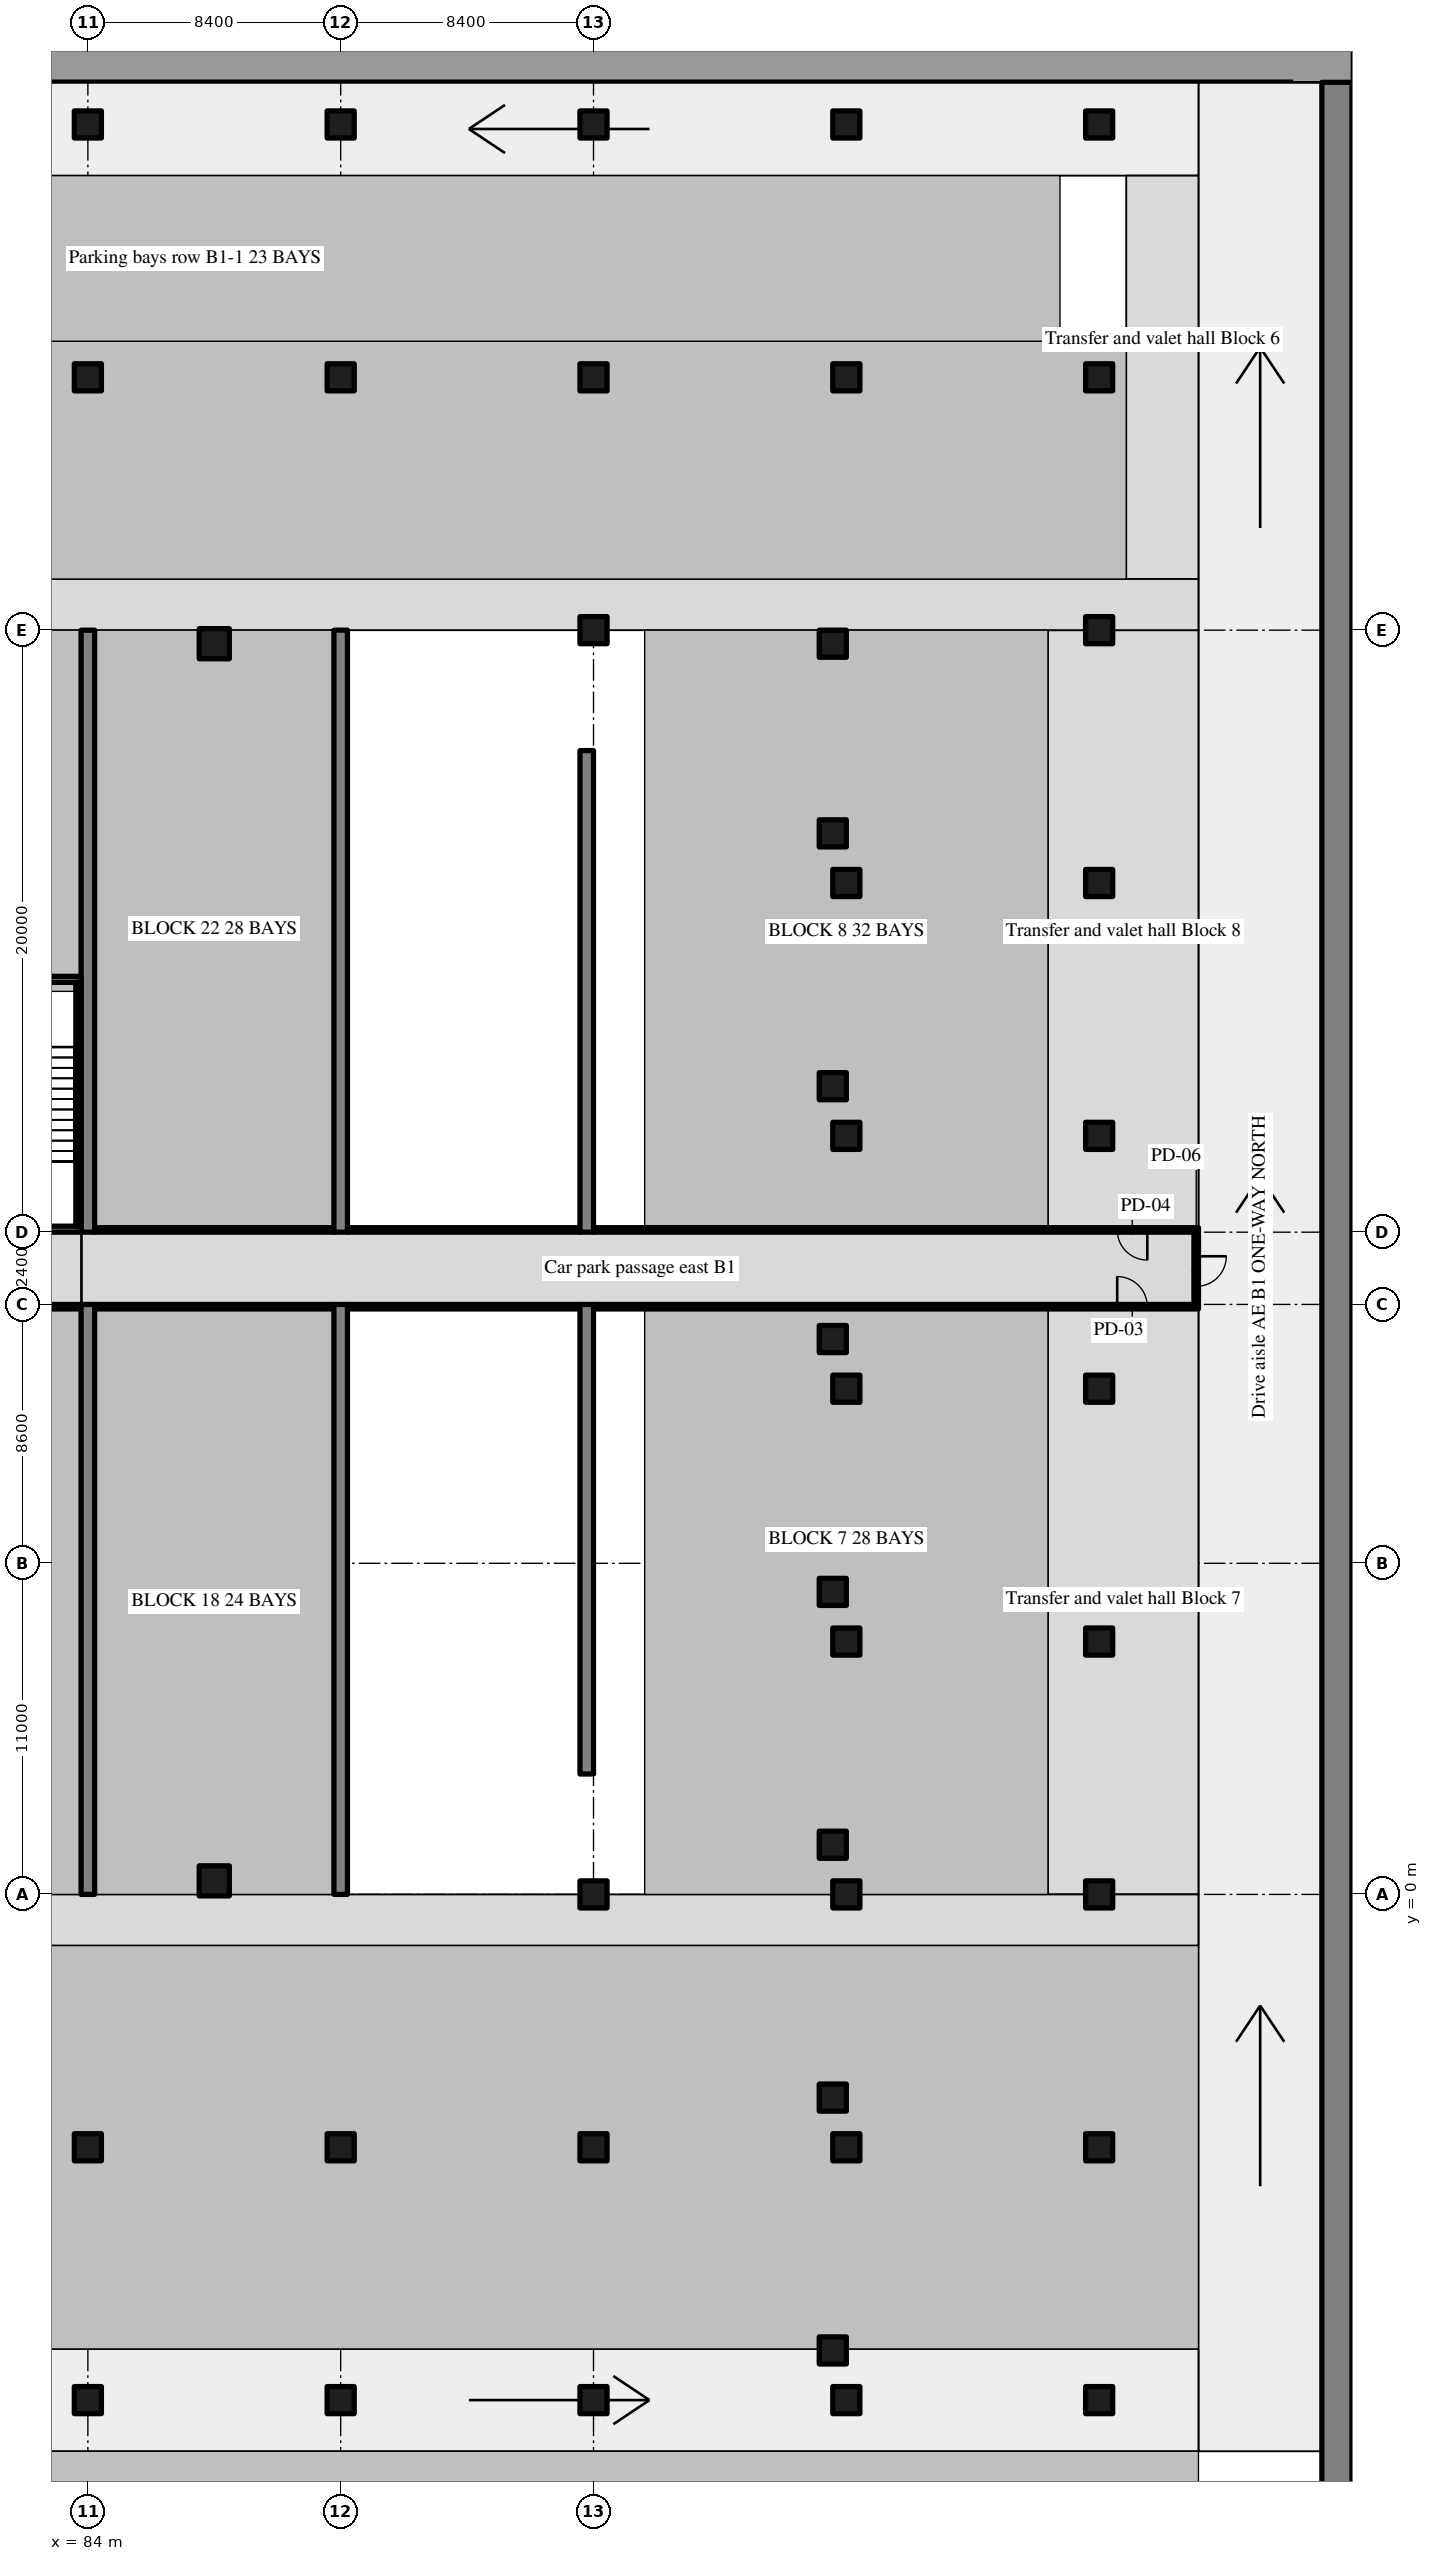
"""IFC4 building model, lengths in metres.
Left out: names, types, materials, properties, quantities, classifications, styles, units other than length and angle.
Written with IfcOpenShell. Run it as: python <this file> out.ifc"""

import sys

from ifc_helpers import new_model, si_unit, direction, frame, frame_2d, origin, origin_2d, place, context, subcontext, project, spatial, rectangle, extrude, source, transform, mapped, element, fill, save


model = new_model("IFC4")
c1 = context("Model", 3, precision=1e-05, world=origin(), true_north=direction((0.0, 1.0)))
c2 = subcontext(c1, "Body", "Model", "MODEL_VIEW")
j1 = project(units=[si_unit("LENGTHUNIT", "METRE"), si_unit("PLANEANGLEUNIT", "RADIAN")], contexts=[c1])
p1 = place(None, origin())
s1 = spatial("IfcSite", under=j1, at=p1, CompositionType="ELEMENT")
p2 = place(p1, origin())
s2 = spatial("IfcBuilding", under=s1, at=p2, CompositionType="ELEMENT")
p3 = place(p2, frame((0.0, 0.0, -4.5)))
s3 = spatial("IfcBuildingStorey", under=s2, at=p3, CompositionType="ELEMENT", Elevation=-4.5)
m1 = source(origin(), c2, "Body", "SweptSolid", [
    extrude(rectangle(XDim=92.8, YDim=1.0, at=frame_2d((46.4, 0.0))), origin(), (0.0, 0.0, 1.0), 4.22),
])
p4 = place(p3, frame((125.5, -32.6, 0.0), z_axis=(0.0, 0.0, 1.0), x_axis=(0.0, 1.0, 0.0)))
e1 = element("IfcWall", 1, at=p4, inside=s3, PredefinedType="SHEAR", context=c2, shape_type="MappedRepresentation", body=[
    mapped(m1, transform((0.0, 0.0, 0.0), scale=1.0)),
])
m2 = source(origin(), c2, "Body", "SweptSolid", [
    extrude(rectangle(XDim=19.6, YDim=0.45, at=frame_2d((9.8, 0.0))), origin(), (0.0, 0.0, 1.0), 4.22),
])
p5 = place(p3, frame((84.0, 0.0, 0.0), z_axis=(0.0, 0.0, 1.0), x_axis=(0.0, 1.0, 0.0)))
e2 = element("IfcWall", 2, at=p5, inside=s3, PredefinedType="SHEAR", context=c2, shape_type="MappedRepresentation", body=[
    mapped(m2, transform((0.0, 0.0, 0.0), scale=1.0)),
])
m3 = source(origin(), c2, "Body", "SweptSolid", [
    extrude(rectangle(XDim=20.0, YDim=0.45, at=frame_2d((10.0, 0.0))), origin(), (0.0, 0.0, 1.0), 4.22),
])
p6 = place(p3, frame((84.0, 22.0, 0.0), z_axis=(0.0, 0.0, 1.0), x_axis=(0.0, 1.0, 0.0)))
e3 = element("IfcWall", 3, at=p6, inside=s3, PredefinedType="SHEAR", context=c2, shape_type="MappedRepresentation", body=[
    mapped(m3, transform((0.0, 0.0, 0.0), scale=1.0)),
])
p7 = place(p3, frame((92.4, 0.0, 0.0), z_axis=(0.0, 0.0, 1.0), x_axis=(0.0, 1.0, 0.0)))
e4 = element("IfcWall", 4, at=p7, inside=s3, PredefinedType="SHEAR", context=c2, shape_type="MappedRepresentation", body=[
    mapped(m2, transform((0.0, 0.0, 0.0), scale=1.0)),
])
p8 = place(p3, frame((92.4, 22.0, 0.0), z_axis=(0.0, 0.0, 1.0), x_axis=(0.0, 1.0, 0.0)))
e5 = element("IfcWall", 5, at=p8, inside=s3, PredefinedType="SHEAR", context=c2, shape_type="MappedRepresentation", body=[
    mapped(m3, transform((0.0, 0.0, 0.0), scale=1.0)),
])
m4 = source(origin(), c2, "Body", "SweptSolid", [
    extrude(rectangle(XDim=15.6, YDim=0.45, at=frame_2d((7.8, 0.0))), origin(), (0.0, 0.0, 1.0), 4.22),
])
p9 = place(p3, frame((100.575, 4.0, 0.0), z_axis=(0.0, 0.0, 1.0), x_axis=(0.0, 1.0, 0.0)))
e6 = element("IfcWall", 6, at=p9, inside=s3, PredefinedType="SHEAR", context=c2, shape_type="MappedRepresentation", body=[
    mapped(m4, transform((0.0, 0.0, 0.0), scale=1.0)),
])
m5 = source(origin(), c2, "Body", "SweptSolid", [
    extrude(rectangle(XDim=16.0, YDim=0.45, at=frame_2d((8.0, 0.0))), origin(), (0.0, 0.0, 1.0), 4.22),
])
p10 = place(p3, frame((100.575, 22.0, 0.0), z_axis=(0.0, 0.0, 1.0), x_axis=(0.0, 1.0, 0.0)))
e7 = element("IfcWall", 7, at=p10, inside=s3, PredefinedType="SHEAR", context=c2, shape_type="MappedRepresentation", body=[
    mapped(m5, transform((0.0, 0.0, 0.0), scale=1.0)),
])
m6 = source(origin(), c2, "Body", "SweptSolid", [
    extrude(rectangle(XDim=1.0, YDim=1.0, at=origin_2d()), origin(), (0.0, 0.0, 1.0), 4.22),
])
for number, where, z_axis, x_axis in (
    (8, (88.2, 0.45, 0.0), (0.0, 0.0, 1.0), (1.0, 0.0, 0.0)),
    (9, (88.2, 41.55, 0.0), (0.0, 0.0, 1.0), (1.0, 0.0, 0.0)),
):
    element("IfcColumn", number, at=place(p3, frame(where, z_axis=z_axis, x_axis=x_axis)), inside=s3, PredefinedType="COLUMN", context=c2, shape_type="MappedRepresentation", body=[
        mapped(m6, transform((0.0, 0.0, 0.0), scale=1.0)),
    ])
m7 = source(origin(), c2, "Body", "SweptSolid", [
    extrude(rectangle(XDim=0.9, YDim=0.9, at=origin_2d()), origin(), (0.0, 0.0, 1.0), 4.22),
])
for number, where, z_axis, x_axis in (
    (10, (108.75, -15.15, 0.0), (0.0, 0.0, 1.0), (1.0, 0.0, 0.0)),
    (11, (108.75, -6.75, 0.0), (0.0, 0.0, 1.0), (1.0, 0.0, 0.0)),
    (12, (108.75, 1.65, 0.0), (0.0, 0.0, 1.0), (1.0, 0.0, 0.0)),
    (13, (108.75, 10.05, 0.0), (0.0, 0.0, 1.0), (1.0, 0.0, 0.0)),
    (14, (108.75, 18.45, 0.0), (0.0, 0.0, 1.0), (1.0, 0.0, 0.0)),
    (15, (108.75, 26.85, 0.0), (0.0, 0.0, 1.0), (1.0, 0.0, 0.0)),
    (16, (108.75, 35.25, 0.0), (0.0, 0.0, 1.0), (1.0, 0.0, 0.0)),
    (17, (108.75, 41.55, 0.0), (0.0, 0.0, 1.0), (1.0, 0.0, 0.0)),
    (18, (84.0, -16.8, 0.0), (0.0, 0.0, 1.0), (1.0, 0.0, 0.0)),
    (19, (84.0, -8.4, 0.0), (0.0, 0.0, 1.0), (1.0, 0.0, 0.0)),
    (20, (84.0, 50.4, 0.0), (0.0, 0.0, 1.0), (1.0, 0.0, 0.0)),
    (21, (84.0, 58.8, 0.0), (0.0, 0.0, 1.0), (1.0, 0.0, 0.0)),
    (22, (92.4, -16.8, 0.0), (0.0, 0.0, 1.0), (1.0, 0.0, 0.0)),
    (23, (92.4, -8.4, 0.0), (0.0, 0.0, 1.0), (1.0, 0.0, 0.0)),
    (24, (92.4, 50.4, 0.0), (0.0, 0.0, 1.0), (1.0, 0.0, 0.0)),
    (25, (92.4, 58.8, 0.0), (0.0, 0.0, 1.0), (1.0, 0.0, 0.0)),
    (26, (100.8, -16.8, 0.0), (0.0, 0.0, 1.0), (1.0, 0.0, 0.0)),
    (27, (100.8, -8.4, 0.0), (0.0, 0.0, 1.0), (1.0, 0.0, 0.0)),
    (28, (100.8, 0.0, 0.0), (0.0, 0.0, 1.0), (1.0, 0.0, 0.0)),
    (29, (100.8, 42.0, 0.0), (0.0, 0.0, 1.0), (1.0, 0.0, 0.0)),
    (30, (100.8, 50.4, 0.0), (0.0, 0.0, 1.0), (1.0, 0.0, 0.0)),
    (31, (100.8, 58.8, 0.0), (0.0, 0.0, 1.0), (1.0, 0.0, 0.0)),
    (32, (109.2, -16.8, 0.0), (0.0, 0.0, 1.0), (1.0, 0.0, 0.0)),
    (33, (109.2, -8.4, 0.0), (0.0, 0.0, 1.0), (1.0, 0.0, 0.0)),
    (34, (109.2, 0.0, 0.0), (0.0, 0.0, 1.0), (1.0, 0.0, 0.0)),
    (35, (109.2, 8.4, 0.0), (0.0, 0.0, 1.0), (1.0, 0.0, 0.0)),
    (36, (109.2, 16.8, 0.0), (0.0, 0.0, 1.0), (1.0, 0.0, 0.0)),
    (37, (109.2, 25.2, 0.0), (0.0, 0.0, 1.0), (1.0, 0.0, 0.0)),
    (38, (109.2, 33.6, 0.0), (0.0, 0.0, 1.0), (1.0, 0.0, 0.0)),
    (39, (109.2, 50.4, 0.0), (0.0, 0.0, 1.0), (1.0, 0.0, 0.0)),
    (40, (109.2, 58.8, 0.0), (0.0, 0.0, 1.0), (1.0, 0.0, 0.0)),
    (41, (117.6, -16.8, 0.0), (0.0, 0.0, 1.0), (1.0, 0.0, 0.0)),
    (42, (117.6, -8.4, 0.0), (0.0, 0.0, 1.0), (1.0, 0.0, 0.0)),
    (43, (117.6, 0.0, 0.0), (0.0, 0.0, 1.0), (1.0, 0.0, 0.0)),
    (44, (117.6, 8.4, 0.0), (0.0, 0.0, 1.0), (1.0, 0.0, 0.0)),
    (45, (117.6, 16.8, 0.0), (0.0, 0.0, 1.0), (1.0, 0.0, 0.0)),
    (46, (117.6, 25.2, 0.0), (0.0, 0.0, 1.0), (1.0, 0.0, 0.0)),
    (47, (117.6, 33.6, 0.0), (0.0, 0.0, 1.0), (1.0, 0.0, 0.0)),
    (48, (117.6, 42.0, 0.0), (0.0, 0.0, 1.0), (1.0, 0.0, 0.0)),
    (49, (117.6, 50.4, 0.0), (0.0, 0.0, 1.0), (1.0, 0.0, 0.0)),
    (50, (117.6, 58.8, 0.0), (0.0, 0.0, 1.0), (1.0, 0.0, 0.0)),
):
    element("IfcColumn", number, at=place(p3, frame(where, z_axis=z_axis, x_axis=x_axis)), inside=s3, PredefinedType="COLUMN", context=c2, shape_type="MappedRepresentation", body=[
        mapped(m7, transform((0.0, 0.0, 0.0), scale=1.0)),
    ])
m8 = source(origin(), c2, "Body", "SweptSolid", [
    extrude(rectangle(XDim=8.175, YDim=0.2, at=frame_2d((4.087, 0.0))), origin(), (0.0, 0.0, 1.0), 4.22),
])
p11 = place(p3, frame((83.775, 22.1, 0.0), z_axis=(0.0, 0.0, 1.0), x_axis=(-1.0, 0.0, 0.0)))
e51 = element("IfcWall", 51, at=p11, inside=s3, PredefinedType="SOLIDWALL", context=c2, shape_type="MappedRepresentation", body=[
    mapped(m8, transform((0.0, 0.0, 0.0), scale=1.0)),
])
m9 = source(origin(), c2, "Body", "SweptSolid", [
    extrude(rectangle(XDim=1.2, YDim=2.1, at=frame_2d((0.6, 1.05))), frame((0.0, 0.11, 0.0), z_axis=(0.0, -1.0, 0.0), x_axis=(1.0, 0.0, 0.0)), (0.0, 0.0, 1.0), 0.22),
])
p12 = place(p11, frame((5.975, 0.0, 0.0)))
e52 = element("IfcOpeningElement", 52, at=p12, cuts=e51, PredefinedType="OPENING", context=c2, shape_type="MappedRepresentation", body=[
    mapped(m9, transform((0.0, 0.0, 0.0), scale=1.0)),
])
p13 = place(p3, frame((83.775, 30.4, 0.0), z_axis=(0.0, 0.0, 1.0), x_axis=(-1.0, 0.0, 0.0)))
e53 = element("IfcWall", 53, at=p13, inside=s3, PredefinedType="SOLIDWALL", context=c2, shape_type="MappedRepresentation", body=[
    mapped(m8, transform((0.0, 0.0, 0.0), scale=1.0)),
])
m10 = source(origin(), c2, "Body", "SweptSolid", [
    extrude(rectangle(XDim=1.0, YDim=2.1, at=frame_2d((0.5, 1.05))), frame((0.0, 0.11, 0.0), z_axis=(0.0, -1.0, 0.0), x_axis=(1.0, 0.0, 0.0)), (0.0, 0.0, 1.0), 0.22),
])
p14 = place(p13, frame((6.075, 0.0, 0.0)))
e54 = element("IfcOpeningElement", 54, at=p14, cuts=e53, PredefinedType="OPENING", context=c2, shape_type="MappedRepresentation", body=[
    mapped(m10, transform((0.0, 0.0, 0.0), scale=1.0)),
])
m11 = source(origin(), c2, "Body", "SweptSolid", [
    extrude(rectangle(XDim=8.1, YDim=0.175, at=frame_2d((4.05, 0.0))), origin(), (0.0, 0.0, 1.0), 4.22),
])
p15 = place(p3, frame((83.688, 22.2, 0.0), z_axis=(0.0, 0.0, 1.0), x_axis=(0.0, 1.0, 0.0)))
e55 = element("IfcWall", 55, at=p15, inside=s3, PredefinedType="SOLIDWALL", context=c2, shape_type="MappedRepresentation", body=[
    mapped(m11, transform((0.0, 0.0, 0.0), scale=1.0)),
])
m12 = source(origin(), c2, "Body", "SweptSolid", [
    extrude(rectangle(XDim=7.95, YDim=0.15, at=frame_2d((3.975, 0.0))), origin(), (0.0, 0.0, 1.0), 4.22),
])
for number, where, z_axis, x_axis in (
    (56, (75.825, 19.525, 0.0), (0.0, 0.0, 1.0), (1.0, 0.0, 0.0)),
    (57, (84.225, 19.525, 0.0), (0.0, 0.0, 1.0), (1.0, 0.0, 0.0)),
    (58, (84.225, 22.075, 0.0), (0.0, 0.0, 1.0), (1.0, 0.0, 0.0)),
):
    element("IfcWall", number, at=place(p3, frame(where, z_axis=z_axis, x_axis=x_axis)), inside=s3, PredefinedType="PARTITIONING", context=c2, shape_type="MappedRepresentation", body=[
        mapped(m12, transform((0.0, 0.0, 0.0), scale=1.0)),
    ])
m13 = source(origin(), c2, "Body", "SweptSolid", [
    extrude(rectangle(XDim=7.725, YDim=0.15, at=frame_2d((3.863, 0.0))), origin(), (0.0, 0.0, 1.0), 4.22),
])
for number, where, z_axis, x_axis in (
    (59, (92.625, 19.525, 0.0), (0.0, 0.0, 1.0), (1.0, 0.0, 0.0)),
    (60, (92.625, 22.075, 0.0), (0.0, 0.0, 1.0), (1.0, 0.0, 0.0)),
):
    element("IfcWall", number, at=place(p3, frame(where, z_axis=z_axis, x_axis=x_axis)), inside=s3, PredefinedType="PARTITIONING", context=c2, shape_type="MappedRepresentation", body=[
        mapped(m13, transform((0.0, 0.0, 0.0), scale=1.0)),
    ])
m14 = source(origin(), c2, "Body", "SweptSolid", [
    extrude(rectangle(XDim=20.1, YDim=0.15, at=frame_2d((10.05, 0.0))), origin(), (0.0, 0.0, 1.0), 4.22),
])
p16 = place(p3, frame((100.8, 19.525, 0.0), z_axis=(0.0, 0.0, 1.0), x_axis=(1.0, 0.0, 0.0)))
e61 = element("IfcWall", 61, at=p16, inside=s3, PredefinedType="PARTITIONING", context=c2, shape_type="MappedRepresentation", body=[
    mapped(m14, transform((0.0, 0.0, 0.0), scale=1.0)),
])
m15 = source(origin(), c2, "Body", "SweptSolid", [
    extrude(rectangle(XDim=1.0, YDim=2.1, at=frame_2d((0.5, 1.05))), frame((0.0, 0.085, 0.0), z_axis=(0.0, -1.0, 0.0), x_axis=(1.0, 0.0, 0.0)), (0.0, 0.0, 1.0), 0.17),
])
p17 = place(p16, frame((17.4, 0.0, 0.0)))
e62 = element("IfcOpeningElement", 62, at=p17, cuts=e61, PredefinedType="OPENING", context=c2, shape_type="MappedRepresentation", body=[
    mapped(m15, transform((0.0, 0.0, 0.0), scale=1.0)),
])
p18 = place(p3, frame((100.8, 22.075, 0.0), z_axis=(0.0, 0.0, 1.0), x_axis=(1.0, 0.0, 0.0)))
e63 = element("IfcWall", 63, at=p18, inside=s3, PredefinedType="PARTITIONING", context=c2, shape_type="MappedRepresentation", body=[
    mapped(m14, transform((0.0, 0.0, 0.0), scale=1.0)),
])
p19 = place(p18, frame((17.4, 0.0, 0.0)))
e64 = element("IfcOpeningElement", 64, at=p19, cuts=e63, PredefinedType="OPENING", context=c2, shape_type="MappedRepresentation", body=[
    mapped(m15, transform((0.0, 0.0, 0.0), scale=1.0)),
])
m16 = source(origin(), c2, "Body", "SweptSolid", [
    extrude(rectangle(XDim=2.4, YDim=0.15, at=frame_2d((1.2, 0.0))), origin(), (0.0, 0.0, 1.0), 4.22),
])
p20 = place(p3, frame((120.825, 19.6, 0.0), z_axis=(0.0, 0.0, 1.0), x_axis=(0.0, 1.0, 0.0)))
e65 = element("IfcWall", 65, at=p20, inside=s3, PredefinedType="PARTITIONING", context=c2, shape_type="MappedRepresentation", body=[
    mapped(m16, transform((0.0, 0.0, 0.0), scale=1.0)),
])
p21 = place(p20, frame((0.6, 0.0, 0.0)))
e66 = element("IfcOpeningElement", 66, at=p21, cuts=e65, PredefinedType="OPENING", context=c2, shape_type="MappedRepresentation", body=[
    mapped(m15, transform((0.0, 0.0, 0.0), scale=1.0)),
])
m17 = source(origin(), c2, "Body", "SweptSolid", [
    extrude(rectangle(XDim=1.0, YDim=2.1, at=frame_2d((0.5, 1.05))), frame((0.0, 0.025, 0.0), z_axis=(0.0, -1.0, 0.0), x_axis=(1.0, 0.0, 0.0)), (0.0, 0.0, 1.0), 0.05),
])
p22 = place(p17, origin())
e67 = element("IfcDoor", 67, at=p22, inside=s3, OperationType="SINGLE_SWING_LEFT", PredefinedType="DOOR", context=c2, shape_type="MappedRepresentation", body=[
    mapped(m17, transform((0.0, 0.0, 0.0), scale=1.0)),
])
fill(e62, e67)
p23 = place(p19, origin())
e68 = element("IfcDoor", 68, at=p23, inside=s3, OperationType="SINGLE_SWING_RIGHT", PredefinedType="DOOR", context=c2, shape_type="MappedRepresentation", body=[
    mapped(m17, transform((0.0, 0.0, 0.0), scale=1.0)),
])
fill(e64, e68)
p24 = place(p21, origin())
e69 = element("IfcDoor", 69, at=p24, inside=s3, OperationType="SINGLE_SWING_RIGHT", PredefinedType="DOOR", context=c2, shape_type="MappedRepresentation", body=[
    mapped(m17, transform((0.0, 0.0, 0.0), scale=1.0)),
])
fill(e66, e69)
save(model, sys.argv[1])
